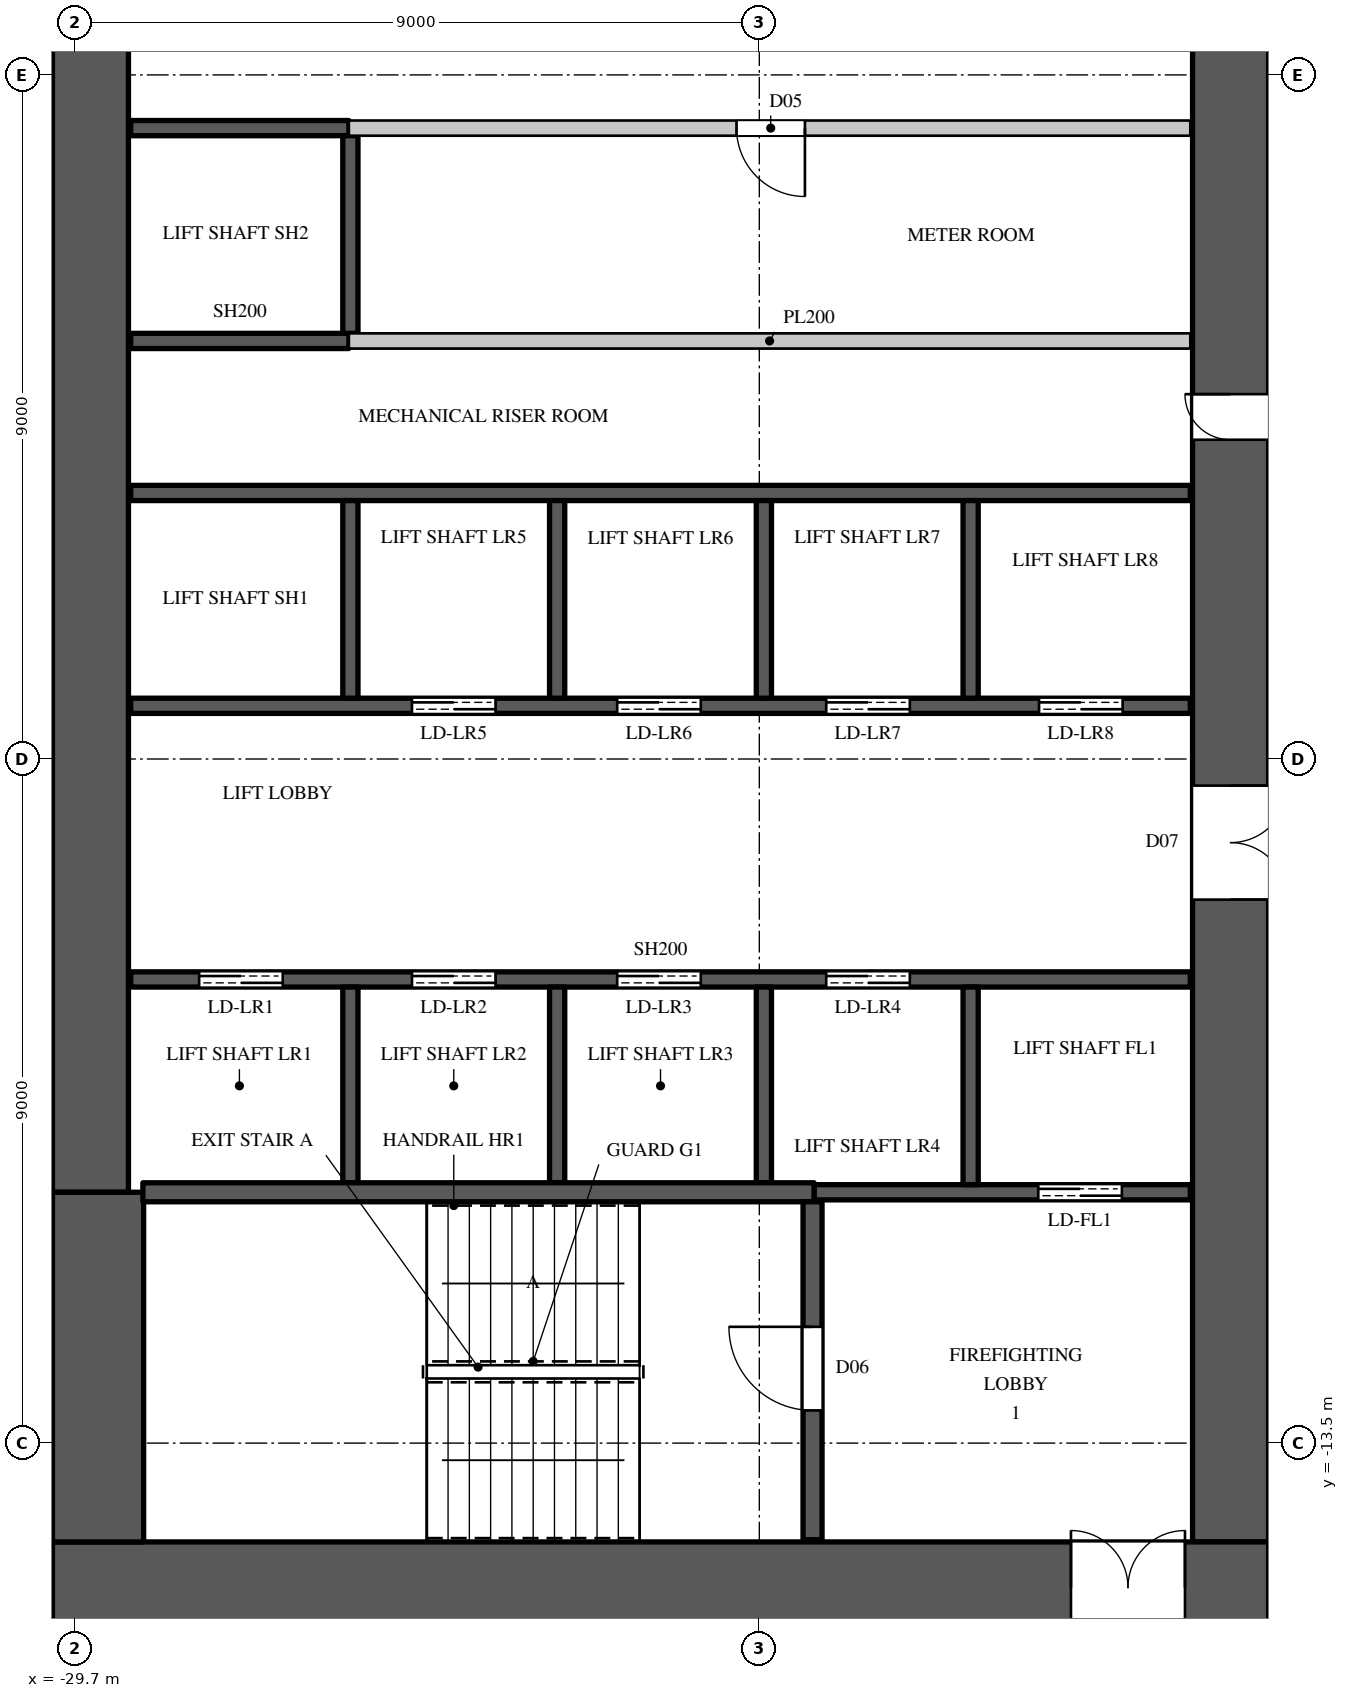
"""IFC4 building model, lengths in metres.
Left out: names, types, materials, properties, quantities, classifications, styles, units other than length and angle.
Written with IfcOpenShell. Run it as: python <this file> out.ifc"""

import sys

from ifc_helpers import new_model, si_unit, direction, frame, frame_2d, origin, place, context, subcontext, project, spatial, rectangle, extrude, element, fill, save


model = new_model("IFC4")
c1 = context("Model", 3, precision=1e-05, world=origin(), true_north=direction((0.0, 1.0)))
c2 = subcontext(c1, "Body", "Model", "MODEL_VIEW")
j1 = project(units=[si_unit("LENGTHUNIT", "METRE"), si_unit("PLANEANGLEUNIT", "RADIAN")], contexts=[c1])
p1 = place(None, origin())
s1 = spatial("IfcSite", under=j1, at=p1, CompositionType="ELEMENT")
p2 = place(p1, origin())
s2 = spatial("IfcBuilding", under=s1, at=p2, CompositionType="ELEMENT")
p3 = place(p2, frame((0.0, 0.0, 69.9)))
s3 = spatial("IfcBuildingStorey", under=s2, at=p3, CompositionType="ELEMENT", Elevation=69.9)
p4 = place(p3, frame((-30.0, -15.4, 0.0), z_axis=(0.0, 0.0, 1.0), x_axis=(1.0, 0.0, 0.0)))
e1 = element("IfcWall", 1, at=p4, inside=s3, PredefinedType="SHEAR", context=c2, shape_type="SweptSolid", body=[
    extrude(rectangle(XDim=16.0, YDim=1.2, at=frame_2d((8.0, 0.0))), origin(), (0.0, 0.0, 1.0), 3.6),
])
p5 = place(p4, frame((13.4, 0.0, 0.0)))
e2 = element("IfcOpeningElement", 2, at=p5, cuts=e1, PredefinedType="OPENING", context=c2, shape_type="SweptSolid", body=[
    extrude(rectangle(XDim=1.5, YDim=2.4, at=frame_2d((0.75, 1.2))), frame((0.0, 0.61, 0.0), z_axis=(0.0, -1.0, 0.0), x_axis=(1.0, 0.0, 0.0)), (0.0, 0.0, 1.0), 1.22),
])
p6 = place(p3, frame((-14.5, -14.8, 0.0), z_axis=(0.0, 0.0, 1.0), x_axis=(0.0, 1.0, 0.0)))
e3 = element("IfcWall", 3, at=p6, inside=s3, PredefinedType="SHEAR", context=c2, shape_type="SweptSolid", body=[
    extrude(rectangle(XDim=29.6, YDim=1.0, at=frame_2d((14.8, 0.0))), origin(), (0.0, 0.0, 1.0), 3.6),
])
p7 = place(p6, frame((8.45, 0.0, 0.0)))
e4 = element("IfcOpeningElement", 4, at=p7, cuts=e3, PredefinedType="OPENING", context=c2, shape_type="SweptSolid", body=[
    extrude(rectangle(XDim=1.5, YDim=2.4, at=frame_2d((0.75, 1.2))), frame((0.0, 0.51, 0.0), z_axis=(0.0, -1.0, 0.0), x_axis=(1.0, 0.0, 0.0)), (0.0, 0.0, 1.0), 1.02),
])
p8 = place(p6, frame((19.65, 0.0, 0.0)))
e5 = element("IfcOpeningElement", 5, at=p8, cuts=e3, PredefinedType="OPENING", context=c2, shape_type="SweptSolid", body=[
    extrude(rectangle(XDim=1.5, YDim=2.4, at=frame_2d((0.75, 1.2))), frame((0.0, 0.51, 0.0), z_axis=(0.0, -1.0, 0.0), x_axis=(1.0, 0.0, 0.0)), (0.0, 0.0, 1.0), 1.02),
])
p9 = place(p6, frame((14.5, 0.0, 0.0)))
e6 = element("IfcOpeningElement", 6, at=p9, cuts=e3, PredefinedType="OPENING", context=c2, shape_type="SweptSolid", body=[
    extrude(rectangle(XDim=0.6, YDim=2.0, at=frame_2d((0.3, 1.0))), frame((0.0, 0.51, 0.0), z_axis=(0.0, -1.0, 0.0), x_axis=(1.0, 0.0, 0.0)), (0.0, 0.0, 1.0), 1.02),
])
p10 = place(p3, frame((-29.5, -10.2, 0.0), z_axis=(0.0, 0.0, 1.0), x_axis=(0.0, 1.0, 0.0)))
e7 = element("IfcWall", 7, at=p10, inside=s3, PredefinedType="SHEAR", context=c2, shape_type="SweptSolid", body=[
    extrude(rectangle(XDim=20.4, YDim=1.0, at=frame_2d((10.2, 0.0))), origin(), (0.0, 0.0, 1.0), 3.6),
])
p11 = place(p3, frame((-29.4, -14.8, 0.0), z_axis=(0.0, 0.0, 1.0), x_axis=(0.0, 1.0, 0.0)))
e8 = element("IfcWall", 8, at=p11, inside=s3, PredefinedType="SHEAR", context=c2, shape_type="SweptSolid", body=[
    extrude(rectangle(XDim=4.6, YDim=1.2, at=frame_2d((2.3, 0.0))), origin(), (0.0, 0.0, 1.0), 3.6),
])
p12 = place(p3, frame((-26.1, 1.0, 0.0), z_axis=(0.0, 0.0, 1.0), x_axis=(1.0, 0.0, 0.0)))
e9 = element("IfcWall", 9, at=p12, inside=s3, PredefinedType="PARTITIONING", context=c2, shape_type="SweptSolid", body=[
    extrude(rectangle(XDim=11.07, YDim=0.2, at=frame_2d((5.535, 0.0))), origin(), (0.0, 0.0, 1.0), 3.3),
])
p13 = place(p3, frame((-26.1, 3.8, 0.0), z_axis=(0.0, 0.0, 1.0), x_axis=(1.0, 0.0, 0.0)))
e10 = element("IfcWall", 10, at=p13, inside=s3, PredefinedType="PARTITIONING", context=c2, shape_type="SweptSolid", body=[
    extrude(rectangle(XDim=11.07, YDim=0.2, at=frame_2d((5.535, 0.0))), origin(), (0.0, 0.0, 1.0), 3.3),
])
p14 = place(p13, frame((5.1, 0.0, 0.0)))
e11 = element("IfcOpeningElement", 11, at=p14, cuts=e10, PredefinedType="OPENING", context=c2, shape_type="SweptSolid", body=[
    extrude(rectangle(XDim=0.9, YDim=2.2, at=frame_2d((0.45, 1.1))), frame((0.0, 0.11, 0.0), z_axis=(0.0, -1.0, 0.0), x_axis=(1.0, 0.0, 0.0)), (0.0, 0.0, 1.0), 0.22),
])
p15 = place(p3, frame((-28.97, -7.4, 0.0), z_axis=(0.0, 0.0, 1.0), x_axis=(1.0, 0.0, 0.0)))
e12 = element("IfcWall", 12, at=p15, inside=s3, PredefinedType="SHEAR", context=c2, shape_type="SweptSolid", body=[
    extrude(rectangle(XDim=13.94, YDim=0.2, at=frame_2d((6.97, 0.0))), origin(), (0.0, 0.0, 1.0), 3.3),
])
p16 = place(p15, frame((0.9, 0.0, 0.0)))
e13 = element("IfcOpeningElement", 13, at=p16, cuts=e12, PredefinedType="OPENING", context=c2, shape_type="SweptSolid", body=[
    extrude(rectangle(XDim=1.1, YDim=2.2, at=frame_2d((0.55, 1.1))), frame((0.0, 0.11, 0.0), z_axis=(0.0, -1.0, 0.0), x_axis=(1.0, 0.0, 0.0)), (0.0, 0.0, 1.0), 0.22),
])
p17 = place(p15, frame((3.7, 0.0, 0.0)))
e14 = element("IfcOpeningElement", 14, at=p17, cuts=e12, PredefinedType="OPENING", context=c2, shape_type="SweptSolid", body=[
    extrude(rectangle(XDim=1.1, YDim=2.2, at=frame_2d((0.55, 1.1))), frame((0.0, 0.11, 0.0), z_axis=(0.0, -1.0, 0.0), x_axis=(1.0, 0.0, 0.0)), (0.0, 0.0, 1.0), 0.22),
])
p18 = place(p15, frame((6.4, 0.0, 0.0)))
e15 = element("IfcOpeningElement", 15, at=p18, cuts=e12, PredefinedType="OPENING", context=c2, shape_type="SweptSolid", body=[
    extrude(rectangle(XDim=1.1, YDim=2.2, at=frame_2d((0.55, 1.1))), frame((0.0, 0.11, 0.0), z_axis=(0.0, -1.0, 0.0), x_axis=(1.0, 0.0, 0.0)), (0.0, 0.0, 1.0), 0.22),
])
p19 = place(p15, frame((9.15, 0.0, 0.0)))
e16 = element("IfcOpeningElement", 16, at=p19, cuts=e12, PredefinedType="OPENING", context=c2, shape_type="SweptSolid", body=[
    extrude(rectangle(XDim=1.1, YDim=2.2, at=frame_2d((0.55, 1.1))), frame((0.0, 0.11, 0.0), z_axis=(0.0, -1.0, 0.0), x_axis=(1.0, 0.0, 0.0)), (0.0, 0.0, 1.0), 0.22),
])
p20 = place(p3, frame((-28.97, -3.8, 0.0), z_axis=(0.0, 0.0, 1.0), x_axis=(1.0, 0.0, 0.0)))
e17 = element("IfcWall", 17, at=p20, inside=s3, PredefinedType="SHEAR", context=c2, shape_type="SweptSolid", body=[
    extrude(rectangle(XDim=13.94, YDim=0.2, at=frame_2d((6.97, 0.0))), origin(), (0.0, 0.0, 1.0), 3.3),
])
p21 = place(p20, frame((3.7, 0.0, 0.0)))
e18 = element("IfcOpeningElement", 18, at=p21, cuts=e17, PredefinedType="OPENING", context=c2, shape_type="SweptSolid", body=[
    extrude(rectangle(XDim=1.1, YDim=2.2, at=frame_2d((0.55, 1.1))), frame((0.0, 0.11, 0.0), z_axis=(0.0, -1.0, 0.0), x_axis=(1.0, 0.0, 0.0)), (0.0, 0.0, 1.0), 0.22),
])
p22 = place(p20, frame((6.4, 0.0, 0.0)))
e19 = element("IfcOpeningElement", 19, at=p22, cuts=e17, PredefinedType="OPENING", context=c2, shape_type="SweptSolid", body=[
    extrude(rectangle(XDim=1.1, YDim=2.2, at=frame_2d((0.55, 1.1))), frame((0.0, 0.11, 0.0), z_axis=(0.0, -1.0, 0.0), x_axis=(1.0, 0.0, 0.0)), (0.0, 0.0, 1.0), 0.22),
])
p23 = place(p20, frame((9.15, 0.0, 0.0)))
e20 = element("IfcOpeningElement", 20, at=p23, cuts=e17, PredefinedType="OPENING", context=c2, shape_type="SweptSolid", body=[
    extrude(rectangle(XDim=1.1, YDim=2.2, at=frame_2d((0.55, 1.1))), frame((0.0, 0.11, 0.0), z_axis=(0.0, -1.0, 0.0), x_axis=(1.0, 0.0, 0.0)), (0.0, 0.0, 1.0), 0.22),
])
p24 = place(p20, frame((11.95, 0.0, 0.0)))
e21 = element("IfcOpeningElement", 21, at=p24, cuts=e17, PredefinedType="OPENING", context=c2, shape_type="SweptSolid", body=[
    extrude(rectangle(XDim=1.1, YDim=2.2, at=frame_2d((0.55, 1.1))), frame((0.0, 0.11, 0.0), z_axis=(0.0, -1.0, 0.0), x_axis=(1.0, 0.0, 0.0)), (0.0, 0.0, 1.0), 0.22),
])
p25 = place(p3, frame((-28.97, -1.0, 0.0), z_axis=(0.0, 0.0, 1.0), x_axis=(1.0, 0.0, 0.0)))
e22 = element("IfcWall", 22, at=p25, inside=s3, PredefinedType="SHEAR", context=c2, shape_type="SweptSolid", body=[
    extrude(rectangle(XDim=13.94, YDim=0.2, at=frame_2d((6.97, 0.0))), origin(), (0.0, 0.0, 1.0), 3.3),
])
for number, where, z_axis, x_axis in (
    (23, (-28.97, 1.0, 0.0), (0.0, 0.0, 1.0), (1.0, 0.0, 0.0)),
    (24, (-28.97, 3.8, 0.0), (0.0, 0.0, 1.0), (1.0, 0.0, 0.0)),
):
    element("IfcWall", number, at=place(p3, frame(where, z_axis=z_axis, x_axis=x_axis)), inside=s3, PredefinedType="SHEAR", context=c2, shape_type="SweptSolid", body=[
        extrude(rectangle(XDim=2.87, YDim=0.2, at=frame_2d((1.435, 0.0))), origin(), (0.0, 0.0, 1.0), 3.3),
    ])
p26 = place(p3, frame((-26.08, -10.075, 0.0), z_axis=(0.0, 0.0, 1.0), x_axis=(0.0, 1.0, 0.0)))
e25 = element("IfcWall", 25, at=p26, inside=s3, PredefinedType="SHEAR", context=c2, shape_type="SweptSolid", body=[
    extrude(rectangle(XDim=2.575, YDim=0.2, at=frame_2d((1.288, 0.0))), origin(), (0.0, 0.0, 1.0), 3.6),
])
p27 = place(p3, frame((-26.08, -3.7, 0.0), z_axis=(0.0, 0.0, 1.0), x_axis=(0.0, 1.0, 0.0)))
e26 = element("IfcWall", 26, at=p27, inside=s3, PredefinedType="SHEAR", context=c2, shape_type="SweptSolid", body=[
    extrude(rectangle(XDim=2.6, YDim=0.2, at=frame_2d((1.3, 0.0))), origin(), (0.0, 0.0, 1.0), 3.6),
])
p28 = place(p3, frame((-26.08, 1.1, 0.0), z_axis=(0.0, 0.0, 1.0), x_axis=(0.0, 1.0, 0.0)))
e27 = element("IfcWall", 27, at=p28, inside=s3, PredefinedType="SHEAR", context=c2, shape_type="SweptSolid", body=[
    extrude(rectangle(XDim=2.6, YDim=0.2, at=frame_2d((1.3, 0.0))), origin(), (0.0, 0.0, 1.0), 3.3),
])
p29 = place(p3, frame((-23.36, -10.075, 0.0), z_axis=(0.0, 0.0, 1.0), x_axis=(0.0, 1.0, 0.0)))
e28 = element("IfcWall", 28, at=p29, inside=s3, PredefinedType="SHEAR", context=c2, shape_type="SweptSolid", body=[
    extrude(rectangle(XDim=2.575, YDim=0.2, at=frame_2d((1.288, 0.0))), origin(), (0.0, 0.0, 1.0), 3.6),
])
p30 = place(p3, frame((-23.36, -3.7, 0.0), z_axis=(0.0, 0.0, 1.0), x_axis=(0.0, 1.0, 0.0)))
e29 = element("IfcWall", 29, at=p30, inside=s3, PredefinedType="SHEAR", context=c2, shape_type="SweptSolid", body=[
    extrude(rectangle(XDim=2.6, YDim=0.2, at=frame_2d((1.3, 0.0))), origin(), (0.0, 0.0, 1.0), 3.6),
])
p31 = place(p3, frame((-20.64, -10.075, 0.0), z_axis=(0.0, 0.0, 1.0), x_axis=(0.0, 1.0, 0.0)))
e30 = element("IfcWall", 30, at=p31, inside=s3, PredefinedType="SHEAR", context=c2, shape_type="SweptSolid", body=[
    extrude(rectangle(XDim=2.575, YDim=0.2, at=frame_2d((1.288, 0.0))), origin(), (0.0, 0.0, 1.0), 3.6),
])
p32 = place(p3, frame((-20.64, -3.7, 0.0), z_axis=(0.0, 0.0, 1.0), x_axis=(0.0, 1.0, 0.0)))
e31 = element("IfcWall", 31, at=p32, inside=s3, PredefinedType="SHEAR", context=c2, shape_type="SweptSolid", body=[
    extrude(rectangle(XDim=2.6, YDim=0.2, at=frame_2d((1.3, 0.0))), origin(), (0.0, 0.0, 1.0), 3.6),
])
p33 = place(p3, frame((-19.98, -10.2, 0.0), z_axis=(0.0, 0.0, 1.0), x_axis=(1.0, 0.0, 0.0)))
e32 = element("IfcWall", 32, at=p33, inside=s3, PredefinedType="SHEAR", context=c2, shape_type="SweptSolid", body=[
    extrude(rectangle(XDim=4.95, YDim=0.2, at=frame_2d((2.475, 0.0))), origin(), (0.0, 0.0, 1.0), 3.3),
])
p34 = place(p33, frame((2.95, 0.0, 0.0)))
e33 = element("IfcOpeningElement", 33, at=p34, cuts=e32, PredefinedType="OPENING", context=c2, shape_type="SweptSolid", body=[
    extrude(rectangle(XDim=1.1, YDim=2.2, at=frame_2d((0.55, 1.1))), frame((0.0, 0.11, 0.0), z_axis=(0.0, -1.0, 0.0), x_axis=(1.0, 0.0, 0.0)), (0.0, 0.0, 1.0), 0.22),
])
p35 = place(p3, frame((-17.92, -10.1, 0.0), z_axis=(0.0, 0.0, 1.0), x_axis=(0.0, 1.0, 0.0)))
e34 = element("IfcWall", 34, at=p35, inside=s3, PredefinedType="SHEAR", context=c2, shape_type="SweptSolid", body=[
    extrude(rectangle(XDim=2.6, YDim=0.2, at=frame_2d((1.3, 0.0))), origin(), (0.0, 0.0, 1.0), 3.6),
])
p36 = place(p3, frame((-17.92, -3.7, 0.0), z_axis=(0.0, 0.0, 1.0), x_axis=(0.0, 1.0, 0.0)))
e35 = element("IfcWall", 35, at=p36, inside=s3, PredefinedType="SHEAR", context=c2, shape_type="SweptSolid", body=[
    extrude(rectangle(XDim=2.6, YDim=0.2, at=frame_2d((1.3, 0.0))), origin(), (0.0, 0.0, 1.0), 3.6),
])
p37 = place(p3, frame((-28.81, -10.2, 0.0), z_axis=(0.0, 0.0, 1.0), x_axis=(1.0, 0.0, 0.0)))
e36 = element("IfcWall", 36, at=p37, inside=s3, PredefinedType="SHEAR", context=c2, shape_type="SweptSolid", body=[
    extrude(rectangle(XDim=8.83, YDim=0.25, at=frame_2d((4.415, 0.0))), origin(), (0.0, 0.0, 1.0), 3.3),
])
p38 = place(p3, frame((-20.0, -14.77, 0.0), z_axis=(0.0, 0.0, 1.0), x_axis=(0.0, 1.0, 0.0)))
e37 = element("IfcWall", 37, at=p38, inside=s3, PredefinedType="SHEAR", context=c2, shape_type="SweptSolid", body=[
    extrude(rectangle(XDim=4.445, YDim=0.25, at=frame_2d((2.223, 0.0))), origin(), (0.0, 0.0, 1.0), 3.3),
])
p39 = place(p38, frame((1.7, 0.0, 0.0)))
e38 = element("IfcOpeningElement", 38, at=p39, cuts=e37, PredefinedType="OPENING", context=c2, shape_type="SweptSolid", body=[
    extrude(rectangle(XDim=1.1, YDim=2.2, at=frame_2d((0.55, 1.1))), frame((0.0, 0.135, 0.0), z_axis=(0.0, -1.0, 0.0), x_axis=(1.0, 0.0, 0.0)), (0.0, 0.0, 1.0), 0.27),
])
p40 = place(p39, origin())
e39 = element("IfcDoor", 39, at=p40, inside=s3, OperationType="SINGLE_SWING_RIGHT", PredefinedType="DOOR", context=c2, shape_type="SweptSolid", body=[
    extrude(rectangle(XDim=1.1, YDim=2.2, at=frame_2d((0.55, 1.1))), frame((0.0, 0.025, 0.0), z_axis=(0.0, -1.0, 0.0), x_axis=(1.0, 0.0, 0.0)), (0.0, 0.0, 1.0), 0.05),
])
fill(e38, e39)
p41 = place(p14, origin())
e40 = element("IfcDoor", 40, at=p41, inside=s3, OperationType="SINGLE_SWING_LEFT", PredefinedType="DOOR", context=c2, shape_type="SweptSolid", body=[
    extrude(rectangle(XDim=0.9, YDim=2.2, at=frame_2d((0.45, 1.1))), frame((0.0, 0.025, 0.0), z_axis=(0.0, -1.0, 0.0), x_axis=(1.0, 0.0, 0.0)), (0.0, 0.0, 1.0), 0.05),
])
fill(e11, e40)
p42 = place(p16, origin())
e41 = element("IfcDoor", 41, at=p42, inside=s3, OperationType="DOUBLE_DOOR_SLIDING", PredefinedType="DOOR", context=c2, shape_type="SweptSolid", body=[
    extrude(rectangle(XDim=1.1, YDim=2.2, at=frame_2d((0.55, 1.1))), frame((0.0, 0.025, 0.0), z_axis=(0.0, -1.0, 0.0), x_axis=(1.0, 0.0, 0.0)), (0.0, 0.0, 1.0), 0.05),
])
fill(e13, e41)
p43 = place(p17, origin())
e42 = element("IfcDoor", 42, at=p43, inside=s3, OperationType="DOUBLE_DOOR_SLIDING", PredefinedType="DOOR", context=c2, shape_type="SweptSolid", body=[
    extrude(rectangle(XDim=1.1, YDim=2.2, at=frame_2d((0.55, 1.1))), frame((0.0, 0.025, 0.0), z_axis=(0.0, -1.0, 0.0), x_axis=(1.0, 0.0, 0.0)), (0.0, 0.0, 1.0), 0.05),
])
fill(e14, e42)
p44 = place(p18, origin())
e43 = element("IfcDoor", 43, at=p44, inside=s3, OperationType="DOUBLE_DOOR_SLIDING", PredefinedType="DOOR", context=c2, shape_type="SweptSolid", body=[
    extrude(rectangle(XDim=1.1, YDim=2.2, at=frame_2d((0.55, 1.1))), frame((0.0, 0.025, 0.0), z_axis=(0.0, -1.0, 0.0), x_axis=(1.0, 0.0, 0.0)), (0.0, 0.0, 1.0), 0.05),
])
fill(e15, e43)
p45 = place(p19, origin())
e44 = element("IfcDoor", 44, at=p45, inside=s3, OperationType="DOUBLE_DOOR_SLIDING", PredefinedType="DOOR", context=c2, shape_type="SweptSolid", body=[
    extrude(rectangle(XDim=1.1, YDim=2.2, at=frame_2d((0.55, 1.1))), frame((0.0, 0.025, 0.0), z_axis=(0.0, -1.0, 0.0), x_axis=(1.0, 0.0, 0.0)), (0.0, 0.0, 1.0), 0.05),
])
fill(e16, e44)
p46 = place(p34, origin())
e45 = element("IfcDoor", 45, at=p46, inside=s3, OperationType="DOUBLE_DOOR_SLIDING", PredefinedType="DOOR", context=c2, shape_type="SweptSolid", body=[
    extrude(rectangle(XDim=1.1, YDim=2.2, at=frame_2d((0.55, 1.1))), frame((0.0, 0.025, 0.0), z_axis=(0.0, -1.0, 0.0), x_axis=(1.0, 0.0, 0.0)), (0.0, 0.0, 1.0), 0.05),
])
fill(e33, e45)
p47 = place(p21, origin())
e46 = element("IfcDoor", 46, at=p47, inside=s3, OperationType="DOUBLE_DOOR_SLIDING", PredefinedType="DOOR", context=c2, shape_type="SweptSolid", body=[
    extrude(rectangle(XDim=1.1, YDim=2.2, at=frame_2d((0.55, 1.1))), frame((0.0, 0.025, 0.0), z_axis=(0.0, -1.0, 0.0), x_axis=(1.0, 0.0, 0.0)), (0.0, 0.0, 1.0), 0.05),
])
fill(e18, e46)
p48 = place(p22, origin())
e47 = element("IfcDoor", 47, at=p48, inside=s3, OperationType="DOUBLE_DOOR_SLIDING", PredefinedType="DOOR", context=c2, shape_type="SweptSolid", body=[
    extrude(rectangle(XDim=1.1, YDim=2.2, at=frame_2d((0.55, 1.1))), frame((0.0, 0.025, 0.0), z_axis=(0.0, -1.0, 0.0), x_axis=(1.0, 0.0, 0.0)), (0.0, 0.0, 1.0), 0.05),
])
fill(e19, e47)
p49 = place(p23, origin())
e48 = element("IfcDoor", 48, at=p49, inside=s3, OperationType="DOUBLE_DOOR_SLIDING", PredefinedType="DOOR", context=c2, shape_type="SweptSolid", body=[
    extrude(rectangle(XDim=1.1, YDim=2.2, at=frame_2d((0.55, 1.1))), frame((0.0, 0.025, 0.0), z_axis=(0.0, -1.0, 0.0), x_axis=(1.0, 0.0, 0.0)), (0.0, 0.0, 1.0), 0.05),
])
fill(e20, e48)
p50 = place(p24, origin())
e49 = element("IfcDoor", 49, at=p50, inside=s3, OperationType="DOUBLE_DOOR_SLIDING", PredefinedType="DOOR", context=c2, shape_type="SweptSolid", body=[
    extrude(rectangle(XDim=1.1, YDim=2.2, at=frame_2d((0.55, 1.1))), frame((0.0, 0.025, 0.0), z_axis=(0.0, -1.0, 0.0), x_axis=(1.0, 0.0, 0.0)), (0.0, 0.0, 1.0), 0.05),
])
fill(e21, e49)
p51 = place(p5, origin())
e50 = element("IfcDoor", 50, at=p51, inside=s3, OperationType="DOUBLE_DOOR_SINGLE_SWING", PredefinedType="DOOR", context=c2, shape_type="SweptSolid", body=[
    extrude(rectangle(XDim=1.5, YDim=2.4, at=frame_2d((0.75, 1.2))), frame((0.0, 0.025, 0.0), z_axis=(0.0, -1.0, 0.0), x_axis=(1.0, 0.0, 0.0)), (0.0, 0.0, 1.0), 0.05),
])
fill(e2, e50)
p52 = place(p7, origin())
e51 = element("IfcDoor", 51, at=p52, inside=s3, OperationType="DOUBLE_DOOR_SINGLE_SWING", PredefinedType="DOOR", context=c2, shape_type="SweptSolid", body=[
    extrude(rectangle(XDim=1.5, YDim=2.4, at=frame_2d((0.75, 1.2))), frame((0.0, -0.445, 0.0), z_axis=(0.0, -1.0, 0.0), x_axis=(1.0, 0.0, 0.0)), (0.0, 0.0, 1.0), 0.05),
])
fill(e4, e51)
p53 = place(p9, origin())
e52 = element("IfcDoor", 52, at=p53, inside=s3, OperationType="SINGLE_SWING_RIGHT", PredefinedType="DOOR", context=c2, shape_type="SweptSolid", body=[
    extrude(rectangle(XDim=0.6, YDim=2.0, at=frame_2d((0.3, 1.0))), frame((0.0, 0.495, 0.0), z_axis=(0.0, -1.0, 0.0), x_axis=(1.0, 0.0, 0.0)), (0.0, 0.0, 1.0), 0.05),
])
fill(e6, e52)
save(model, sys.argv[1])
